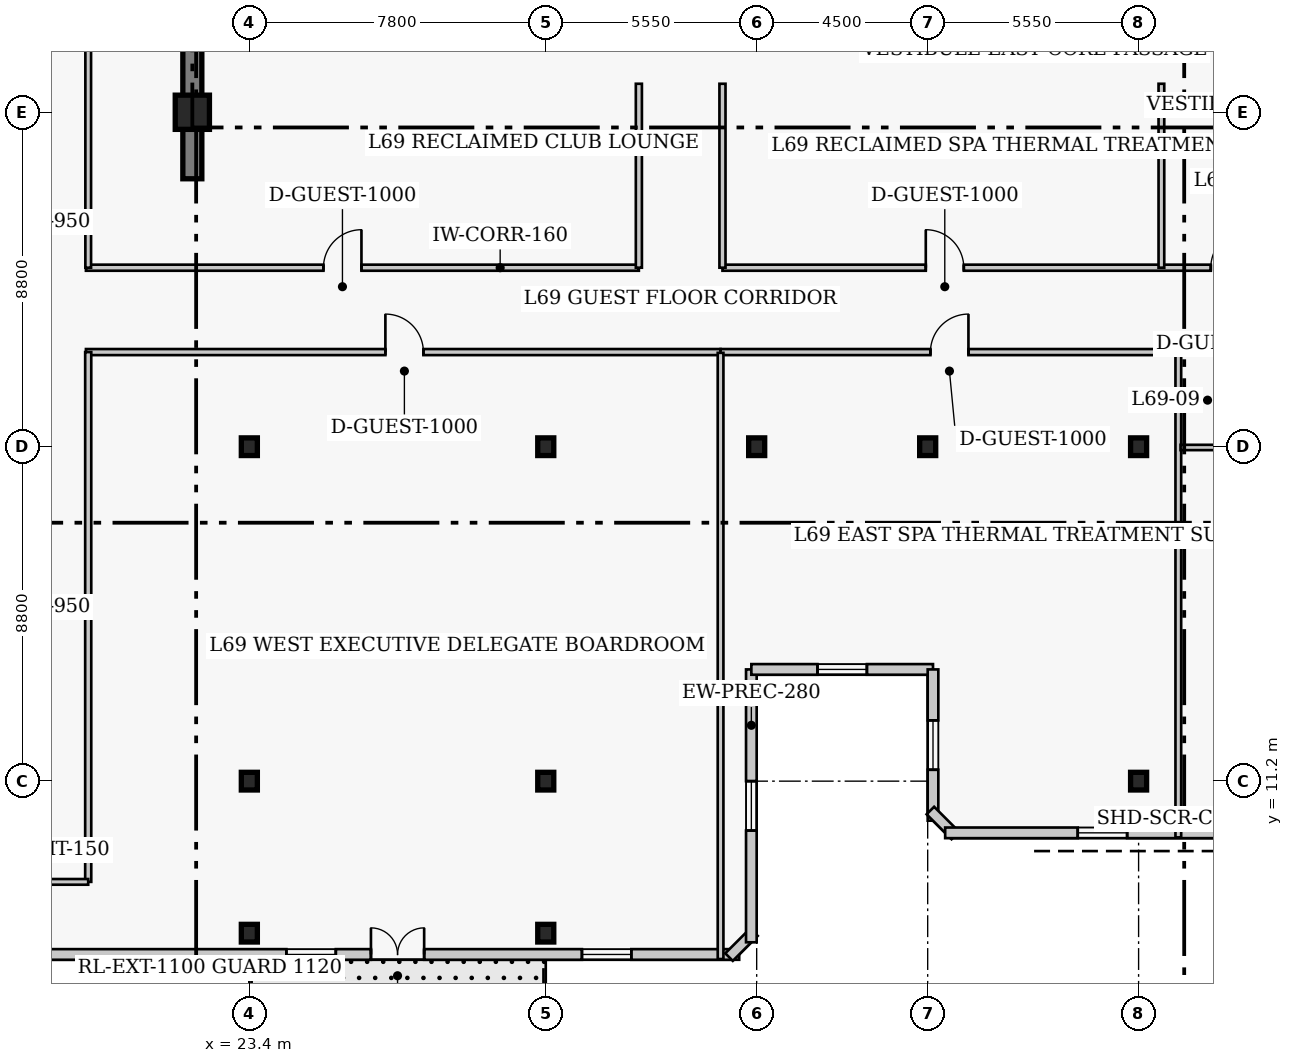
"""IFC4 building model, lengths in metres.
Left out: names, types, materials, properties, quantities, classifications, styles, units other than length and angle.
Written with IfcOpenShell. Run it as: python <this file> out.ifc"""

import sys

from ifc_helpers import new_model, si_unit, direction, frame, frame_2d, origin, origin_2d, place, context, subcontext, project, spatial, rectangle, i_section, extrude, element, fill, save


model = new_model("IFC4")
c1 = context("Model", 3, precision=1e-05, world=origin(), true_north=direction((0.0, 1.0)))
c2 = subcontext(c1, "Body", "Model", "MODEL_VIEW")
j1 = project(units=[si_unit("LENGTHUNIT", "METRE"), si_unit("PLANEANGLEUNIT", "RADIAN")], contexts=[c1])
p1 = place(None, origin())
s1 = spatial("IfcSite", under=j1, at=p1, CompositionType="ELEMENT")
p2 = place(p1, origin())
s2 = spatial("IfcBuilding", under=s1, at=p2, CompositionType="ELEMENT")
p3 = place(p2, frame((0.0, 0.0, 277.4)))
s3 = spatial("IfcBuildingStorey", under=s2, at=p3, CompositionType="ELEMENT", Elevation=277.4)
p4 = place(p3, frame((21.9, 27.05, 0.0), z_axis=(0.0, 0.0, 1.0), x_axis=(0.0, 1.0, 0.0)))
e1 = element("IfcWall", 1, at=p4, inside=s3, PredefinedType="SHEAR", context=c2, shape_type="SweptSolid", body=[
    extrude(rectangle(XDim=13.52, YDim=0.5, at=frame_2d((6.76, 0.0))), origin(), (0.0, 0.0, 1.0), 4.0),
])
for number, where, z_axis, x_axis in (
    (2, (23.4, 11.2, 0.0), (0.0, 0.0, 1.0), (1.0, 0.0, 0.0)),
    (3, (23.4, 20.0, 0.0), (0.0, 0.0, 1.0), (1.0, 0.0, 0.0)),
    (4, (31.2, 11.2, 0.0), (0.0, 0.0, 1.0), (1.0, 0.0, 0.0)),
    (5, (31.2, 20.0, 0.0), (0.0, 0.0, 1.0), (1.0, 0.0, 0.0)),
    (6, (36.75, 20.0, 0.0), (0.0, 0.0, 1.0), (1.0, 0.0, 0.0)),
    (7, (41.25, 20.0, 0.0), (0.0, 0.0, 1.0), (1.0, 0.0, 0.0)),
    (8, (46.8, 11.2, 0.0), (0.0, 0.0, 1.0), (1.0, 0.0, 0.0)),
    (9, (46.8, 20.0, 0.0), (0.0, 0.0, 1.0), (1.0, 0.0, 0.0)),
):
    element("IfcColumn", number, at=place(p3, frame(where, z_axis=z_axis, x_axis=x_axis)), inside=s3, PredefinedType="COLUMN", context=c2, shape_type="SweptSolid", body=[
        extrude(i_section(OverallWidth=0.422, OverallDepth=0.465, WebThickness=0.045, FlangeThickness=0.073, FilletRadius=0.017, at=origin_2d()), origin(), (0.0, 0.0, 1.0), 4.0),
    ])
p5 = place(p3, frame((21.9, 28.8, 0.0), z_axis=(0.0, 0.0, 1.0), x_axis=(1.0, 0.0, 0.0)))
e10 = element("IfcColumn", 10, at=p5, inside=s3, PredefinedType="COLUMN", context=c2, shape_type="SweptSolid", body=[
    extrude(rectangle(XDim=0.9, YDim=0.9, at=origin_2d()), origin(), (0.0, 0.0, 1.0), 4.0),
])
for number, where, z_axis, x_axis in (
    (11, (23.4, 7.2, 0.0), (0.0, 0.0, 1.0), (1.0, 0.0, 0.0)),
    (12, (31.2, 7.2, 0.0), (0.0, 0.0, 1.0), (1.0, 0.0, 0.0)),
):
    element("IfcColumn", number, at=place(p3, frame(where, z_axis=z_axis, x_axis=x_axis)), inside=s3, PredefinedType="COLUMN", context=c2, shape_type="SweptSolid", body=[
        extrude(i_section(OverallWidth=0.422, OverallDepth=0.465, WebThickness=0.045, FlangeThickness=0.073, FilletRadius=0.017, at=origin_2d()), origin(), (0.0, 0.0, 1.0), 4.0),
    ])
p6 = place(p3, frame((11.46, 6.64, 0.0), z_axis=(0.0, 0.0, 1.0), x_axis=(1.0, 0.0, 0.0)))
e13 = element("IfcWall", 13, at=p6, inside=s3, PredefinedType="SOLIDWALL", context=c2, shape_type="SweptSolid", body=[
    extrude(rectangle(XDim=24.83, YDim=0.28, at=frame_2d((12.415, 0.0))), origin(), (0.0, 0.0, 1.0), 3.76),
])
p7 = place(p6, frame((15.14, 0.0, 0.0)))
e14 = element("IfcOpeningElement", 14, at=p7, cuts=e13, PredefinedType="OPENING", context=c2, shape_type="SweptSolid", body=[
    extrude(rectangle(XDim=1.4, YDim=2.15, at=frame_2d((0.7, 1.075))), frame((0.0, 0.15, 0.0), z_axis=(0.0, -1.0, 0.0), x_axis=(1.0, 0.0, 0.0)), (0.0, 0.0, 1.0), 0.3),
])
p8 = place(p6, frame((3.488, 0.0, 0.85)))
e15 = element("IfcOpeningElement", 15, at=p8, cuts=e13, PredefinedType="OPENING", context=c2, shape_type="SweptSolid", body=[
    extrude(rectangle(XDim=1.3, YDim=1.7, at=frame_2d((0.65, 0.85))), frame((0.0, 0.15, 0.0), z_axis=(0.0, -1.0, 0.0), x_axis=(1.0, 0.0, 0.0)), (0.0, 0.0, 1.0), 0.3),
])
p9 = place(p6, frame((12.915, 0.0, 0.85)))
e16 = element("IfcOpeningElement", 16, at=p9, cuts=e13, PredefinedType="OPENING", context=c2, shape_type="SweptSolid", body=[
    extrude(rectangle(XDim=1.3, YDim=1.7, at=frame_2d((0.65, 0.85))), frame((0.0, 0.15, 0.0), z_axis=(0.0, -1.0, 0.0), x_axis=(1.0, 0.0, 0.0)), (0.0, 0.0, 1.0), 0.3),
])
p10 = place(p6, frame((20.692, 0.0, 0.85)))
e17 = element("IfcOpeningElement", 17, at=p10, cuts=e13, PredefinedType="OPENING", context=c2, shape_type="SweptSolid", body=[
    extrude(rectangle(XDim=1.3, YDim=1.7, at=frame_2d((0.65, 0.85))), frame((0.0, 0.15, 0.0), z_axis=(0.0, -1.0, 0.0), x_axis=(1.0, 0.0, 0.0)), (0.0, 0.0, 1.0), 0.3),
])
p11 = place(p3, frame((36.023, 6.571, 0.0), z_axis=(0.0, 0.0, 1.0), x_axis=(0.707106781187, 0.707106781187, 0.0)))
e18 = element("IfcWall", 18, at=p11, inside=s3, PredefinedType="SOLIDWALL", context=c2, shape_type="SweptSolid", body=[
    extrude(rectangle(XDim=0.928, YDim=0.28, at=frame_2d((0.464, 0.0))), origin(), (0.0, 0.0, 1.0), 3.76),
])
p12 = place(p3, frame((36.61, 6.96, 0.0), z_axis=(0.0, 0.0, 1.0), x_axis=(0.0, 1.0, 0.0)))
e19 = element("IfcWall", 19, at=p12, inside=s3, PredefinedType="SOLIDWALL", context=c2, shape_type="SweptSolid", body=[
    extrude(rectangle(XDim=7.18, YDim=0.28, at=frame_2d((3.59, 0.0))), origin(), (0.0, 0.0, 1.0), 3.76),
])
p13 = place(p12, frame((2.94, 0.0, 0.85)))
e20 = element("IfcOpeningElement", 20, at=p13, cuts=e19, PredefinedType="OPENING", context=c2, shape_type="SweptSolid", body=[
    extrude(rectangle(XDim=1.3, YDim=1.7, at=frame_2d((0.65, 0.85))), frame((0.0, 0.15, 0.0), z_axis=(0.0, -1.0, 0.0), x_axis=(1.0, 0.0, 0.0)), (0.0, 0.0, 1.0), 0.3),
])
p14 = place(p3, frame((36.61, 14.14, 0.0), z_axis=(0.0, 0.0, 1.0), x_axis=(1.0, 0.0, 0.0)))
e21 = element("IfcWall", 21, at=p14, inside=s3, PredefinedType="SOLIDWALL", context=c2, shape_type="SweptSolid", body=[
    extrude(rectangle(XDim=4.78, YDim=0.28, at=frame_2d((2.39, 0.0))), origin(), (0.0, 0.0, 1.0), 3.76),
])
p15 = place(p14, frame((1.74, 0.0, 0.85)))
e22 = element("IfcOpeningElement", 22, at=p15, cuts=e21, PredefinedType="OPENING", context=c2, shape_type="SweptSolid", body=[
    extrude(rectangle(XDim=1.3, YDim=1.7, at=frame_2d((0.65, 0.85))), frame((0.0, 0.15, 0.0), z_axis=(0.0, -1.0, 0.0), x_axis=(1.0, 0.0, 0.0)), (0.0, 0.0, 1.0), 0.3),
])
p16 = place(p3, frame((41.39, 14.14, 0.0), z_axis=(0.0, 0.0, 1.0), x_axis=(0.0, -1.0, 0.0)))
e23 = element("IfcWall", 23, at=p16, inside=s3, PredefinedType="SOLIDWALL", context=c2, shape_type="SweptSolid", body=[
    extrude(rectangle(XDim=3.98, YDim=0.28, at=frame_2d((1.99, 0.0))), origin(), (0.0, 0.0, 1.0), 3.76),
])
p17 = place(p16, frame((1.34, 0.0, 0.85)))
e24 = element("IfcOpeningElement", 24, at=p17, cuts=e23, PredefinedType="OPENING", context=c2, shape_type="SweptSolid", body=[
    extrude(rectangle(XDim=1.3, YDim=1.7, at=frame_2d((0.65, 0.85))), frame((0.0, 0.15, 0.0), z_axis=(0.0, -1.0, 0.0), x_axis=(1.0, 0.0, 0.0)), (0.0, 0.0, 1.0), 0.3),
])
p18 = place(p3, frame((41.321, 10.427, 0.0), z_axis=(0.0, 0.0, 1.0), x_axis=(0.707106781187, -0.707106781187, 0.0)))
e25 = element("IfcWall", 25, at=p18, inside=s3, PredefinedType="SOLIDWALL", context=c2, shape_type="SweptSolid", body=[
    extrude(rectangle(XDim=0.928, YDim=0.28, at=frame_2d((0.464, 0.0))), origin(), (0.0, 0.0, 1.0), 3.76),
])
p19 = place(p3, frame((41.71, 9.84, 0.0), z_axis=(0.0, 0.0, 1.0), x_axis=(1.0, 0.0, 0.0)))
e26 = element("IfcWall", 26, at=p19, inside=s3, PredefinedType="SOLIDWALL", context=c2, shape_type="SweptSolid", body=[
    extrude(rectangle(XDim=24.83, YDim=0.28, at=frame_2d((12.415, 0.0))), origin(), (0.0, 0.0, 1.0), 3.76),
])
p20 = place(p19, frame((3.488, 0.0, 0.85)))
e27 = element("IfcOpeningElement", 27, at=p20, cuts=e26, PredefinedType="OPENING", context=c2, shape_type="SweptSolid", body=[
    extrude(rectangle(XDim=1.3, YDim=1.7, at=frame_2d((0.65, 0.85))), frame((0.0, 0.15, 0.0), z_axis=(0.0, -1.0, 0.0), x_axis=(1.0, 0.0, 0.0)), (0.0, 0.0, 1.0), 0.3),
])
p21 = place(p19, frame((11.115, 0.0, 0.85)))
e28 = element("IfcOpeningElement", 28, at=p21, cuts=e26, PredefinedType="OPENING", context=c2, shape_type="SweptSolid", body=[
    extrude(rectangle(XDim=1.3, YDim=1.7, at=frame_2d((0.65, 0.85))), frame((0.0, 0.15, 0.0), z_axis=(0.0, -1.0, 0.0), x_axis=(1.0, 0.0, 0.0)), (0.0, 0.0, 1.0), 0.3),
])
p22 = place(p19, frame((18.892, 0.0, 0.85)))
e29 = element("IfcOpeningElement", 29, at=p22, cuts=e26, PredefinedType="OPENING", context=c2, shape_type="SweptSolid", body=[
    extrude(rectangle(XDim=1.3, YDim=1.7, at=frame_2d((0.65, 0.85))), frame((0.0, 0.15, 0.0), z_axis=(0.0, -1.0, 0.0), x_axis=(1.0, 0.0, 0.0)), (0.0, 0.0, 1.0), 0.3),
])
p23 = place(p3, frame((19.1, 24.71, 0.0), z_axis=(0.0, 0.0, 1.0), x_axis=(1.0, 0.0, 0.0)))
e30 = element("IfcWall", 30, at=p23, inside=s3, PredefinedType="PARTITIONING", context=c2, shape_type="SweptSolid", body=[
    extrude(rectangle(XDim=14.55, YDim=0.16, at=frame_2d((7.275, 0.0))), origin(), (0.0, 0.0, 1.0), 3.76),
])
p24 = place(p23, frame((6.25, 0.0, 0.0)))
e31 = element("IfcOpeningElement", 31, at=p24, cuts=e30, PredefinedType="OPENING", context=c2, shape_type="SweptSolid", body=[
    extrude(rectangle(XDim=1.0, YDim=2.15, at=frame_2d((0.5, 1.075))), frame((0.0, 0.09, 0.0), z_axis=(0.0, -1.0, 0.0), x_axis=(1.0, 0.0, 0.0)), (0.0, 0.0, 1.0), 0.18),
])
p25 = place(p3, frame((35.85, 24.71, 0.0), z_axis=(0.0, 0.0, 1.0), x_axis=(1.0, 0.0, 0.0)))
e32 = element("IfcWall", 32, at=p25, inside=s3, PredefinedType="PARTITIONING", context=c2, shape_type="SweptSolid", body=[
    extrude(rectangle(XDim=23.0, YDim=0.16, at=frame_2d((11.5, 0.0))), origin(), (0.0, 0.0, 1.0), 3.76),
])
p26 = place(p25, frame((5.35, 0.0, 0.0)))
e33 = element("IfcOpeningElement", 33, at=p26, cuts=e32, PredefinedType="OPENING", context=c2, shape_type="SweptSolid", body=[
    extrude(rectangle(XDim=1.0, YDim=2.15, at=frame_2d((0.5, 1.075))), frame((0.0, 0.09, 0.0), z_axis=(0.0, -1.0, 0.0), x_axis=(1.0, 0.0, 0.0)), (0.0, 0.0, 1.0), 0.18),
])
p27 = place(p25, frame((12.85, 0.0, 0.0)))
e34 = element("IfcOpeningElement", 34, at=p27, cuts=e32, PredefinedType="OPENING", context=c2, shape_type="SweptSolid", body=[
    extrude(rectangle(XDim=1.0, YDim=2.15, at=frame_2d((0.5, 1.075))), frame((0.0, 0.09, 0.0), z_axis=(0.0, -1.0, 0.0), x_axis=(1.0, 0.0, 0.0)), (0.0, 0.0, 1.0), 0.18),
])
for number, where, z_axis, x_axis in (
    (35, (33.65, 24.71, 0.0), (0.0, 0.0, 1.0), (0.0, 1.0, 0.0)),
    (36, (35.85, 24.71, 0.0), (0.0, 0.0, 1.0), (0.0, 1.0, 0.0)),
):
    element("IfcWall", number, at=place(p3, frame(where, z_axis=z_axis, x_axis=x_axis)), inside=s3, PredefinedType="PARTITIONING", context=c2, shape_type="SweptSolid", body=[
        extrude(rectangle(XDim=4.84, YDim=0.16, at=frame_2d((2.42, 0.0))), origin(), (0.0, 0.0, 1.0), 3.76),
    ])
p28 = place(p3, frame((19.1, 22.49, 0.0), z_axis=(0.0, 0.0, 1.0), x_axis=(1.0, 0.0, 0.0)))
e37 = element("IfcWall", 37, at=p28, inside=s3, PredefinedType="PARTITIONING", context=c2, shape_type="SweptSolid", body=[
    extrude(rectangle(XDim=16.7, YDim=0.16, at=frame_2d((8.35, 0.0))), origin(), (0.0, 0.0, 1.0), 3.76),
])
p29 = place(p28, frame((7.88, 0.0, 0.0)))
e38 = element("IfcOpeningElement", 38, at=p29, cuts=e37, PredefinedType="OPENING", context=c2, shape_type="SweptSolid", body=[
    extrude(rectangle(XDim=1.0, YDim=2.15, at=frame_2d((0.5, 1.075))), frame((0.0, 0.09, 0.0), z_axis=(0.0, -1.0, 0.0), x_axis=(1.0, 0.0, 0.0)), (0.0, 0.0, 1.0), 0.18),
])
p30 = place(p3, frame((35.8, 22.49, 0.0), z_axis=(0.0, 0.0, 1.0), x_axis=(1.0, 0.0, 0.0)))
e39 = element("IfcWall", 39, at=p30, inside=s3, PredefinedType="PARTITIONING", context=c2, shape_type="SweptSolid", body=[
    extrude(rectangle(XDim=25.21, YDim=0.16, at=frame_2d((12.605, 0.0))), origin(), (0.0, 0.0, 1.0), 3.76),
])
p31 = place(p30, frame((5.522, 0.0, 0.0)))
e40 = element("IfcOpeningElement", 40, at=p31, cuts=e39, PredefinedType="OPENING", context=c2, shape_type="SweptSolid", body=[
    extrude(rectangle(XDim=1.0, YDim=2.15, at=frame_2d((0.5, 1.075))), frame((0.0, 0.09, 0.0), z_axis=(0.0, -1.0, 0.0), x_axis=(1.0, 0.0, 0.0)), (0.0, 0.0, 1.0), 0.18),
])
p32 = place(p30, frame((18.198, 0.0, 0.0)))
e41 = element("IfcOpeningElement", 41, at=p32, cuts=e39, PredefinedType="OPENING", context=c2, shape_type="SweptSolid", body=[
    extrude(rectangle(XDim=0.95, YDim=2.1, at=frame_2d((0.475, 1.05))), frame((0.0, 0.09, 0.0), z_axis=(0.0, -1.0, 0.0), x_axis=(1.0, 0.0, 0.0)), (0.0, 0.0, 1.0), 0.18),
])
p33 = place(p30, frame((23.665, 0.0, 0.0)))
e42 = element("IfcOpeningElement", 42, at=p33, cuts=e39, PredefinedType="OPENING", context=c2, shape_type="SweptSolid", body=[
    extrude(rectangle(XDim=0.95, YDim=2.1, at=frame_2d((0.475, 1.05))), frame((0.0, 0.09, 0.0), z_axis=(0.0, -1.0, 0.0), x_axis=(1.0, 0.0, 0.0)), (0.0, 0.0, 1.0), 0.18),
])
p34 = place(p3, frame((19.16, 8.55, 0.0), z_axis=(0.0, 0.0, 1.0), x_axis=(0.0, 1.0, 0.0)))
e43 = element("IfcWall", 43, at=p34, inside=s3, PredefinedType="PARTITIONING", context=c2, shape_type="SweptSolid", body=[
    extrude(rectangle(XDim=13.94, YDim=0.16, at=frame_2d((6.97, 0.0))), origin(), (0.0, 0.0, 1.0), 3.76),
])
p35 = place(p3, frame((16.94, 8.55, 0.0), z_axis=(0.0, 0.0, 1.0), x_axis=(1.0, 0.0, 0.0)))
e44 = element("IfcWall", 44, at=p35, inside=s3, PredefinedType="PARTITIONING", context=c2, shape_type="SweptSolid", body=[
    extrude(rectangle(XDim=2.22, YDim=0.15, at=frame_2d((1.11, 0.0))), origin(), (0.0, 0.0, 1.0), 3.76),
])
p36 = place(p3, frame((19.16, 24.71, 0.0), z_axis=(0.0, 0.0, 1.0), x_axis=(0.0, 1.0, 0.0)))
e45 = element("IfcWall", 45, at=p36, inside=s3, PredefinedType="PARTITIONING", context=c2, shape_type="SweptSolid", body=[
    extrude(rectangle(XDim=8.09, YDim=0.15, at=frame_2d((4.045, 0.0))), origin(), (0.0, 0.0, 1.0), 3.76),
])
p37 = place(p3, frame((47.4, 24.71, 0.0), z_axis=(0.0, 0.0, 1.0), x_axis=(0.0, 1.0, 0.0)))
e46 = element("IfcWall", 46, at=p37, inside=s3, PredefinedType="PARTITIONING", context=c2, shape_type="SweptSolid", body=[
    extrude(rectangle(XDim=4.84, YDim=0.15, at=frame_2d((2.42, 0.0))), origin(), (0.0, 0.0, 1.0), 3.76),
])
p38 = place(p3, frame((35.8, 6.52, 0.0), z_axis=(0.0, 0.0, 1.0), x_axis=(0.0, 1.0, 0.0)))
e47 = element("IfcWall", 47, at=p38, inside=s3, PredefinedType="PARTITIONING", context=c2, shape_type="SweptSolid", body=[
    extrude(rectangle(XDim=15.95, YDim=0.15, at=frame_2d((7.975, 0.0))), origin(), (0.0, 0.0, 1.0), 3.76),
])
p39 = place(p3, frame((47.845, 9.72, 0.0), z_axis=(0.0, 0.0, 1.0), x_axis=(0.0, 1.0, 0.0)))
e48 = element("IfcWall", 48, at=p39, inside=s3, PredefinedType="PARTITIONING", context=c2, shape_type="SweptSolid", body=[
    extrude(rectangle(XDim=12.77, YDim=0.15, at=frame_2d((6.385, 0.0))), origin(), (0.0, 0.0, 1.0), 3.76),
])
p40 = place(p3, frame((47.905, 19.98, 0.0), z_axis=(0.0, 0.0, 1.0), x_axis=(1.0, 0.0, 0.0)))
e49 = element("IfcWall", 49, at=p40, inside=s3, PredefinedType="PLUMBINGWALL", context=c2, shape_type="SweptSolid", body=[
    extrude(rectangle(XDim=2.25, YDim=0.14, at=frame_2d((1.125, 0.0))), origin(), (0.0, 0.0, 1.0), 3.064),
])
p41 = place(p7, origin())
e50 = element("IfcDoor", 50, at=p41, inside=s3, OperationType="DOUBLE_DOOR_SINGLE_SWING", PredefinedType="DOOR", context=c2, shape_type="SweptSolid", body=[
    extrude(rectangle(XDim=1.4, YDim=2.15, at=frame_2d((0.7, 1.075))), frame((0.0, 0.025, 0.0), z_axis=(0.0, -1.0, 0.0), x_axis=(1.0, 0.0, 0.0)), (0.0, 0.0, 1.0), 0.05),
])
fill(e14, e50)
p42 = place(p9, origin())
e51 = element("IfcWindow", 51, at=p42, inside=s3, PartitioningType="SINGLE_PANEL", PredefinedType="WINDOW", context=c2, shape_type="SweptSolid", body=[
    extrude(rectangle(XDim=1.3, YDim=1.7, at=frame_2d((0.65, 0.85))), frame((0.0, 0.03, 0.0), z_axis=(0.0, -1.0, 0.0), x_axis=(1.0, 0.0, 0.0)), (0.0, 0.0, 1.0), 0.06),
])
fill(e16, e51)
p43 = place(p10, origin())
e52 = element("IfcWindow", 52, at=p43, inside=s3, PartitioningType="SINGLE_PANEL", PredefinedType="WINDOW", context=c2, shape_type="SweptSolid", body=[
    extrude(rectangle(XDim=1.3, YDim=1.7, at=frame_2d((0.65, 0.85))), frame((0.0, 0.03, 0.0), z_axis=(0.0, -1.0, 0.0), x_axis=(1.0, 0.0, 0.0)), (0.0, 0.0, 1.0), 0.06),
])
fill(e17, e52)
p44 = place(p13, origin())
e53 = element("IfcWindow", 53, at=p44, inside=s3, PartitioningType="SINGLE_PANEL", PredefinedType="WINDOW", context=c2, shape_type="SweptSolid", body=[
    extrude(rectangle(XDim=1.3, YDim=1.7, at=frame_2d((0.65, 0.85))), frame((0.0, 0.03, 0.0), z_axis=(0.0, -1.0, 0.0), x_axis=(1.0, 0.0, 0.0)), (0.0, 0.0, 1.0), 0.06),
])
fill(e20, e53)
p45 = place(p15, origin())
e54 = element("IfcWindow", 54, at=p45, inside=s3, PartitioningType="SINGLE_PANEL", PredefinedType="WINDOW", context=c2, shape_type="SweptSolid", body=[
    extrude(rectangle(XDim=1.3, YDim=1.7, at=frame_2d((0.65, 0.85))), frame((0.0, 0.03, 0.0), z_axis=(0.0, -1.0, 0.0), x_axis=(1.0, 0.0, 0.0)), (0.0, 0.0, 1.0), 0.06),
])
fill(e22, e54)
p46 = place(p17, origin())
e55 = element("IfcWindow", 55, at=p46, inside=s3, PartitioningType="SINGLE_PANEL", PredefinedType="WINDOW", context=c2, shape_type="SweptSolid", body=[
    extrude(rectangle(XDim=1.3, YDim=1.7, at=frame_2d((0.65, 0.85))), frame((0.0, 0.03, 0.0), z_axis=(0.0, -1.0, 0.0), x_axis=(1.0, 0.0, 0.0)), (0.0, 0.0, 1.0), 0.06),
])
fill(e24, e55)
p47 = place(p20, origin())
e56 = element("IfcWindow", 56, at=p47, inside=s3, PartitioningType="SINGLE_PANEL", PredefinedType="WINDOW", context=c2, shape_type="SweptSolid", body=[
    extrude(rectangle(XDim=1.3, YDim=1.7, at=frame_2d((0.65, 0.85))), frame((0.0, 0.03, 0.0), z_axis=(0.0, -1.0, 0.0), x_axis=(1.0, 0.0, 0.0)), (0.0, 0.0, 1.0), 0.06),
])
fill(e27, e56)
p48 = place(p24, origin())
e57 = element("IfcDoor", 57, at=p48, inside=s3, OperationType="SINGLE_SWING_RIGHT", PredefinedType="DOOR", context=c2, shape_type="SweptSolid", body=[
    extrude(rectangle(XDim=1.0, YDim=2.15, at=frame_2d((0.5, 1.075))), frame((0.0, 0.025, 0.0), z_axis=(0.0, -1.0, 0.0), x_axis=(1.0, 0.0, 0.0)), (0.0, 0.0, 1.0), 0.05),
])
fill(e31, e57)
p49 = place(p26, origin())
e58 = element("IfcDoor", 58, at=p49, inside=s3, OperationType="SINGLE_SWING_LEFT", PredefinedType="DOOR", context=c2, shape_type="SweptSolid", body=[
    extrude(rectangle(XDim=1.0, YDim=2.15, at=frame_2d((0.5, 1.075))), frame((0.0, 0.025, 0.0), z_axis=(0.0, -1.0, 0.0), x_axis=(1.0, 0.0, 0.0)), (0.0, 0.0, 1.0), 0.05),
])
fill(e33, e58)
p50 = place(p27, origin())
e59 = element("IfcDoor", 59, at=p50, inside=s3, OperationType="SINGLE_SWING_RIGHT", PredefinedType="DOOR", context=c2, shape_type="SweptSolid", body=[
    extrude(rectangle(XDim=1.0, YDim=2.15, at=frame_2d((0.5, 1.075))), frame((0.0, 0.025, 0.0), z_axis=(0.0, -1.0, 0.0), x_axis=(1.0, 0.0, 0.0)), (0.0, 0.0, 1.0), 0.05),
])
fill(e34, e59)
p51 = place(p29, origin())
e60 = element("IfcDoor", 60, at=p51, inside=s3, OperationType="SINGLE_SWING_LEFT", PredefinedType="DOOR", context=c2, shape_type="SweptSolid", body=[
    extrude(rectangle(XDim=1.0, YDim=2.15, at=frame_2d((0.5, 1.075))), frame((0.0, 0.025, 0.0), z_axis=(0.0, -1.0, 0.0), x_axis=(1.0, 0.0, 0.0)), (0.0, 0.0, 1.0), 0.05),
])
fill(e38, e60)
p52 = place(p31, origin())
e61 = element("IfcDoor", 61, at=p52, inside=s3, OperationType="SINGLE_SWING_RIGHT", PredefinedType="DOOR", context=c2, shape_type="SweptSolid", body=[
    extrude(rectangle(XDim=1.0, YDim=2.15, at=frame_2d((0.5, 1.075))), frame((0.0, 0.025, 0.0), z_axis=(0.0, -1.0, 0.0), x_axis=(1.0, 0.0, 0.0)), (0.0, 0.0, 1.0), 0.05),
])
fill(e40, e61)
save(model, sys.argv[1])
